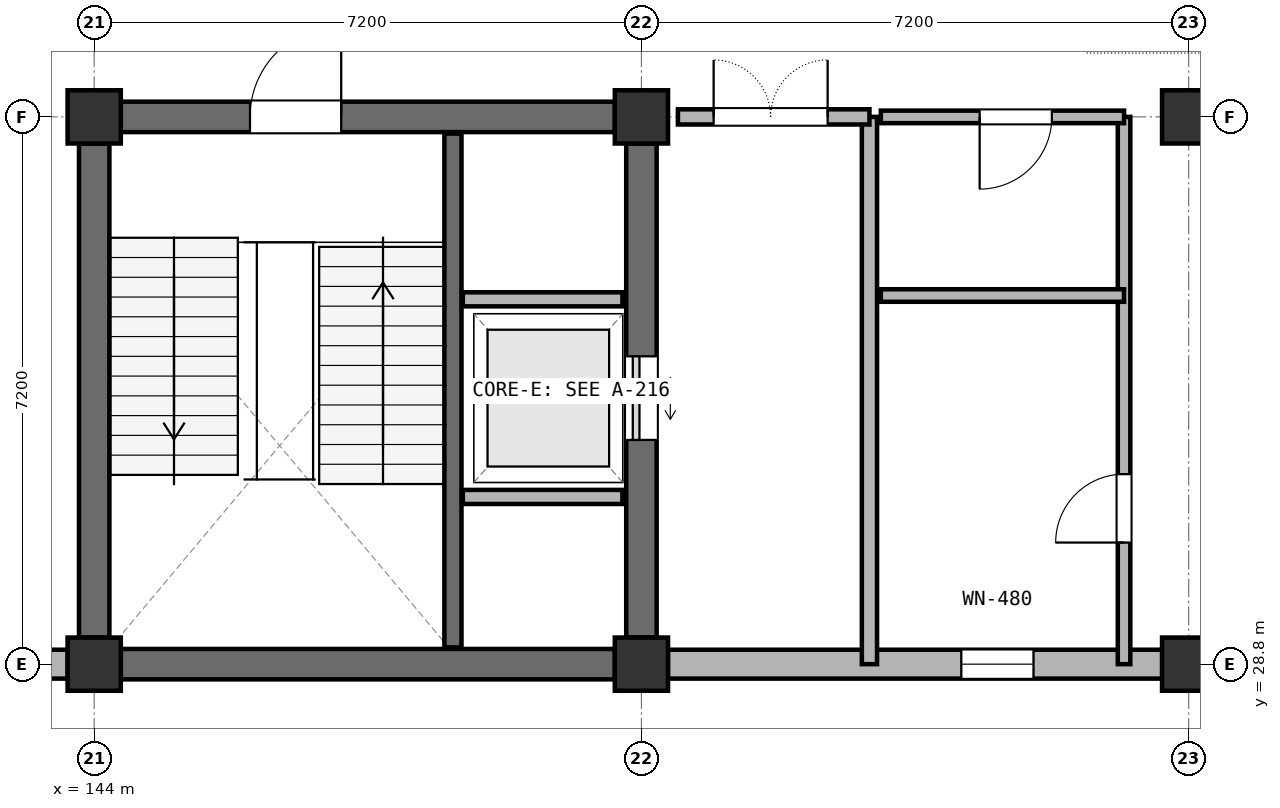
"""IFC4 building model, lengths in metres.
Left out: names, types, materials, properties, quantities, classifications, styles, units other than length and angle.
Written with IfcOpenShell. Run it as: python <this file> out.ifc"""

import sys

from ifc_helpers import new_model, si_unit, direction, frame, frame_2d, origin, origin_2d, place, context, subcontext, project, spatial, rectangle, extrude, element, fill, save


model = new_model("IFC4")
c1 = context("Model", 3, precision=1e-05, world=origin(), true_north=direction((0.0, 1.0)))
c2 = subcontext(c1, "Body", "Model", "MODEL_VIEW")
j1 = project(units=[si_unit("LENGTHUNIT", "METRE"), si_unit("PLANEANGLEUNIT", "RADIAN")], contexts=[c1])
p1 = place(None, origin())
s1 = spatial("IfcSite", under=j1, at=p1, CompositionType="ELEMENT")
p2 = place(p1, origin())
s2 = spatial("IfcBuilding", under=s1, at=p2, CompositionType="ELEMENT")
p3 = place(p2, frame((0.0, 0.0, 10.2)))
s3 = spatial("IfcBuildingStorey", under=s2, at=p3, CompositionType="ELEMENT", Elevation=10.2)
for number, where, z_axis, x_axis in (
    (1, (144.0, 28.8, 0.0), (0.0, 0.0, 1.0), (1.0, 0.0, 0.0)),
    (2, (144.0, 36.0, 0.0), (0.0, 0.0, 1.0), (1.0, 0.0, 0.0)),
    (3, (151.2, 28.8, 0.0), (0.0, 0.0, 1.0), (1.0, 0.0, 0.0)),
    (4, (151.2, 36.0, 0.0), (0.0, 0.0, 1.0), (1.0, 0.0, 0.0)),
    (5, (158.4, 28.8, 0.0), (0.0, 0.0, 1.0), (1.0, 0.0, 0.0)),
    (6, (158.4, 36.0, 0.0), (0.0, 0.0, 1.0), (1.0, 0.0, 0.0)),
):
    element("IfcColumn", number, at=place(p3, frame(where, z_axis=z_axis, x_axis=x_axis)), inside=s3, PredefinedType="COLUMN", context=c2, shape_type="SweptSolid", body=[
        extrude(rectangle(XDim=0.7, YDim=0.7, at=origin_2d()), origin(), (0.0, 0.0, 1.0), 4.2),
    ])
p4 = place(p3, frame((144.35, 28.8, 0.0), z_axis=(0.0, 0.0, 1.0), x_axis=(1.0, 0.0, 0.0)))
e7 = element("IfcWall", 7, at=p4, inside=s3, PredefinedType="SHEAR", context=c2, shape_type="SweptSolid", body=[
    extrude(rectangle(XDim=6.5, YDim=0.4, at=frame_2d((3.25, 0.0))), origin(), (0.0, 0.0, 1.0), 4.2),
])
p5 = place(p3, frame((151.2, 29.15, 0.0), z_axis=(0.0, 0.0, 1.0), x_axis=(0.0, 1.0, 0.0)))
e8 = element("IfcWall", 8, at=p5, inside=s3, PredefinedType="SHEAR", context=c2, shape_type="SweptSolid", body=[
    extrude(rectangle(XDim=6.5, YDim=0.4, at=frame_2d((3.25, 0.0))), origin(), (0.0, 0.0, 1.0), 4.2),
])
p6 = place(p5, frame((2.6, 0.0, 0.0)))
e9 = element("IfcOpeningElement", 9, at=p6, cuts=e8, PredefinedType="OPENING", context=c2, shape_type="SweptSolid", body=[
    extrude(rectangle(XDim=1.1, YDim=2.2, at=frame_2d((0.55, 1.1))), frame((0.0, 0.21, 0.0), z_axis=(0.0, -1.0, 0.0), x_axis=(1.0, 0.0, 0.0)), (0.0, 0.0, 1.0), 0.42),
])
p7 = place(p3, frame((150.85, 36.0, 0.0), z_axis=(0.0, 0.0, 1.0), x_axis=(-1.0, 0.0, 0.0)))
e10 = element("IfcWall", 10, at=p7, inside=s3, PredefinedType="SHEAR", context=c2, shape_type="SweptSolid", body=[
    extrude(rectangle(XDim=6.5, YDim=0.4, at=frame_2d((3.25, 0.0))), origin(), (0.0, 0.0, 1.0), 4.2),
])
p8 = place(p7, frame((3.6, 0.0, 0.0)))
e11 = element("IfcOpeningElement", 11, at=p8, cuts=e10, PredefinedType="OPENING", context=c2, shape_type="SweptSolid", body=[
    extrude(rectangle(XDim=1.2, YDim=2.2, at=frame_2d((0.6, 1.1))), frame((0.0, 0.21, 0.0), z_axis=(0.0, -1.0, 0.0), x_axis=(1.0, 0.0, 0.0)), (0.0, 0.0, 1.0), 0.42),
])
p9 = place(p3, frame((144.0, 35.65, 0.0), z_axis=(0.0, 0.0, 1.0), x_axis=(0.0, -1.0, 0.0)))
e12 = element("IfcWall", 12, at=p9, inside=s3, PredefinedType="SHEAR", context=c2, shape_type="SweptSolid", body=[
    extrude(rectangle(XDim=6.5, YDim=0.4, at=frame_2d((3.25, 0.0))), origin(), (0.0, 0.0, 1.0), 4.2),
])
p10 = place(p3, frame((148.72, 29.02, 0.0), z_axis=(0.0, 0.0, 1.0), x_axis=(0.0, 1.0, 0.0)))
e13 = element("IfcWall", 13, at=p10, inside=s3, PredefinedType="SHEAR", context=c2, shape_type="SweptSolid", body=[
    extrude(rectangle(XDim=6.76, YDim=0.225, at=frame_2d((3.38, 0.0))), origin(), (0.0, 0.0, 1.0), 4.2),
])
for number, where, z_axis, x_axis in (
    (14, (148.85, 31.0, 0.0), (0.0, 0.0, 1.0), (1.0, 0.0, 0.0)),
    (15, (148.85, 33.6, 0.0), (0.0, 0.0, 1.0), (1.0, 0.0, 0.0)),
):
    element("IfcWall", number, at=place(p3, frame(where, z_axis=z_axis, x_axis=x_axis)), inside=s3, PredefinedType="PARTITIONING", context=c2, shape_type="SweptSolid", body=[
        extrude(rectangle(XDim=2.1, YDim=0.185, at=frame_2d((1.05, 0.0))), origin(), (0.0, 0.0, 1.0), 4.2),
    ])
p11 = place(p3, frame((137.148, 28.8, 0.0), z_axis=(0.0, 0.0, 1.0), x_axis=(1.0, 0.0, 0.0)))
e16 = element("IfcWall", 16, at=p11, inside=s3, PredefinedType="SOLIDWALL", context=c2, shape_type="SweptSolid", body=[
    extrude(rectangle(XDim=6.504, YDim=0.38, at=frame_2d((3.252, 0.0))), origin(), (0.0, 0.0, 1.0), 3.04),
])
p12 = place(p11, frame((2.752, 0.0, 0.7)))
e17 = element("IfcOpeningElement", 17, at=p12, cuts=e16, PredefinedType="OPENING", context=c2, shape_type="SweptSolid", body=[
    extrude(rectangle(XDim=0.95, YDim=2.15, at=frame_2d((0.475, 1.075))), frame((0.0, 0.2, 0.0), z_axis=(0.0, -1.0, 0.0), x_axis=(1.0, 0.0, 0.0)), (0.0, 0.0, 1.0), 0.4),
])
p13 = place(p3, frame((151.548, 28.8, 0.0), z_axis=(0.0, 0.0, 1.0), x_axis=(1.0, 0.0, 0.0)))
e18 = element("IfcWall", 18, at=p13, inside=s3, PredefinedType="SOLIDWALL", context=c2, shape_type="SweptSolid", body=[
    extrude(rectangle(XDim=6.504, YDim=0.38, at=frame_2d((3.252, 0.0))), origin(), (0.0, 0.0, 1.0), 3.04),
])
p14 = place(p13, frame((3.861, 0.0, 0.7)))
e19 = element("IfcOpeningElement", 19, at=p14, cuts=e18, PredefinedType="OPENING", context=c2, shape_type="SweptSolid", body=[
    extrude(rectangle(XDim=0.95, YDim=2.15, at=frame_2d((0.475, 1.075))), frame((0.0, 0.2, 0.0), z_axis=(0.0, -1.0, 0.0), x_axis=(1.0, 0.0, 0.0)), (0.0, 0.0, 1.0), 0.4),
])
p15 = place(p3, frame((154.2, 28.8, 0.0), z_axis=(0.0, 0.0, 1.0), x_axis=(0.0, 1.0, 0.0)))
e20 = element("IfcWall", 20, at=p15, inside=s3, PredefinedType="PARTITIONING", context=c2, shape_type="SweptSolid", body=[
    extrude(rectangle(XDim=7.2, YDim=0.2, at=frame_2d((3.6, 0.0))), origin(), (0.0, 0.0, 1.0), 3.08),
])
p16 = place(p3, frame((154.2, 36.0, 0.0), z_axis=(0.0, 0.0, 1.0), x_axis=(-1.0, 0.0, 0.0)))
e21 = element("IfcWall", 21, at=p16, inside=s3, PredefinedType="PARTITIONING", context=c2, shape_type="SweptSolid", body=[
    extrude(rectangle(XDim=2.52, YDim=0.2, at=frame_2d((1.26, 0.0))), origin(), (0.0, 0.0, 1.0), 3.08),
])
p17 = place(p16, frame((0.55, 0.0, 0.0)))
e22 = element("IfcOpeningElement", 22, at=p17, cuts=e21, PredefinedType="OPENING", context=c2, shape_type="SweptSolid", body=[
    extrude(rectangle(XDim=1.5, YDim=2.2, at=frame_2d((0.75, 1.1))), frame((0.0, 0.11, 0.0), z_axis=(0.0, -1.0, 0.0), x_axis=(1.0, 0.0, 0.0)), (0.0, 0.0, 1.0), 0.22),
])
p18 = place(p3, frame((157.55, 28.8, 0.0), z_axis=(0.0, 0.0, 1.0), x_axis=(0.0, 1.0, 0.0)))
e23 = element("IfcWall", 23, at=p18, inside=s3, PredefinedType="PARTITIONING", context=c2, shape_type="SweptSolid", body=[
    extrude(rectangle(XDim=7.2, YDim=0.165, at=frame_2d((3.6, 0.0))), origin(), (0.0, 0.0, 1.0), 3.08),
])
p19 = place(p18, frame((1.6, 0.0, 0.0)))
e24 = element("IfcOpeningElement", 24, at=p19, cuts=e23, PredefinedType="OPENING", context=c2, shape_type="SweptSolid", body=[
    extrude(rectangle(XDim=0.9, YDim=2.15, at=frame_2d((0.45, 1.075))), frame((0.0, 0.093, 0.0), z_axis=(0.0, -1.0, 0.0), x_axis=(1.0, 0.0, 0.0)), (0.0, 0.0, 1.0), 0.185),
])
p20 = place(p3, frame((157.55, 36.0, 0.0), z_axis=(0.0, 0.0, 1.0), x_axis=(-1.0, 0.0, 0.0)))
e25 = element("IfcWall", 25, at=p20, inside=s3, PredefinedType="PARTITIONING", context=c2, shape_type="SweptSolid", body=[
    extrude(rectangle(XDim=3.2, YDim=0.165, at=frame_2d((1.6, 0.0))), origin(), (0.0, 0.0, 1.0), 3.08),
])
p21 = place(p20, frame((0.95, 0.0, 0.0)))
e26 = element("IfcOpeningElement", 26, at=p21, cuts=e25, PredefinedType="OPENING", context=c2, shape_type="SweptSolid", body=[
    extrude(rectangle(XDim=0.95, YDim=2.15, at=frame_2d((0.475, 1.075))), frame((0.0, 0.093, 0.0), z_axis=(0.0, -1.0, 0.0), x_axis=(1.0, 0.0, 0.0)), (0.0, 0.0, 1.0), 0.185),
])
p22 = place(p3, frame((154.35, 33.65, 0.0), z_axis=(0.0, 0.0, 1.0), x_axis=(1.0, 0.0, 0.0)))
e27 = element("IfcWall", 27, at=p22, inside=s3, PredefinedType="PARTITIONING", context=c2, shape_type="SweptSolid", body=[
    extrude(rectangle(XDim=3.2, YDim=0.165, at=frame_2d((1.6, 0.0))), origin(), (0.0, 0.0, 1.0), 3.08),
])
p23 = place(p6, origin())
e28 = element("IfcDoor", 28, at=p23, inside=s3, OperationType="SLIDING_TO_LEFT", PredefinedType="DOOR", context=c2, shape_type="SweptSolid", body=[
    extrude(rectangle(XDim=1.1, YDim=2.2, at=frame_2d((0.55, 1.1))), frame((0.0, 0.025, 0.0), z_axis=(0.0, -1.0, 0.0), x_axis=(1.0, 0.0, 0.0)), (0.0, 0.0, 1.0), 0.05),
])
fill(e9, e28)
p24 = place(p14, origin())
e29 = element("IfcWindow", 29, at=p24, inside=s3, PartitioningType="SINGLE_PANEL", PredefinedType="WINDOW", context=c2, shape_type="SweptSolid", body=[
    extrude(rectangle(XDim=0.95, YDim=2.15, at=frame_2d((0.475, 1.075))), frame((0.0, 0.03, 0.0), z_axis=(0.0, -1.0, 0.0), x_axis=(1.0, 0.0, 0.0)), (0.0, 0.0, 1.0), 0.06),
])
fill(e19, e29)
p25 = place(p8, frame((1.2, 0.0, 0.0), z_axis=(0.0, 0.0, 1.0), x_axis=(-1.0, 0.0, 0.0)))
e30 = element("IfcDoor", 30, at=p25, inside=s3, OperationType="SINGLE_SWING_RIGHT", PredefinedType="DOOR", context=c2, shape_type="SweptSolid", body=[
    extrude(rectangle(XDim=1.2, YDim=2.2, at=frame_2d((0.6, 1.1))), frame((0.0, 0.025, 0.0), z_axis=(0.0, -1.0, 0.0), x_axis=(1.0, 0.0, 0.0)), (0.0, 0.0, 1.0), 0.05),
])
fill(e11, e30)
p26 = place(p17, frame((1.5, 0.0, 0.0), z_axis=(0.0, 0.0, 1.0), x_axis=(-1.0, 0.0, 0.0)))
e31 = element("IfcDoor", 31, at=p26, inside=s3, OperationType="DOUBLE_DOOR_SINGLE_SWING", PredefinedType="DOOR", context=c2, shape_type="SweptSolid", body=[
    extrude(rectangle(XDim=1.5, YDim=2.2, at=frame_2d((0.75, 1.1))), frame((0.0, 0.025, 0.0), z_axis=(0.0, -1.0, 0.0), x_axis=(1.0, 0.0, 0.0)), (0.0, 0.0, 1.0), 0.05),
])
fill(e22, e31)
p27 = place(p19, origin())
e32 = element("IfcDoor", 32, at=p27, inside=s3, OperationType="SINGLE_SWING_LEFT", PredefinedType="DOOR", context=c2, shape_type="SweptSolid", body=[
    extrude(rectangle(XDim=0.9, YDim=2.15, at=frame_2d((0.45, 1.075))), frame((0.0, 0.025, 0.0), z_axis=(0.0, -1.0, 0.0), x_axis=(1.0, 0.0, 0.0)), (0.0, 0.0, 1.0), 0.05),
])
fill(e24, e32)
p28 = place(p21, origin())
e33 = element("IfcDoor", 33, at=p28, inside=s3, OperationType="SINGLE_SWING_RIGHT", PredefinedType="DOOR", context=c2, shape_type="SweptSolid", body=[
    extrude(rectangle(XDim=0.95, YDim=2.15, at=frame_2d((0.475, 1.075))), frame((0.0, 0.025, 0.0), z_axis=(0.0, -1.0, 0.0), x_axis=(1.0, 0.0, 0.0)), (0.0, 0.0, 1.0), 0.05),
])
fill(e26, e33)
save(model, sys.argv[1])
